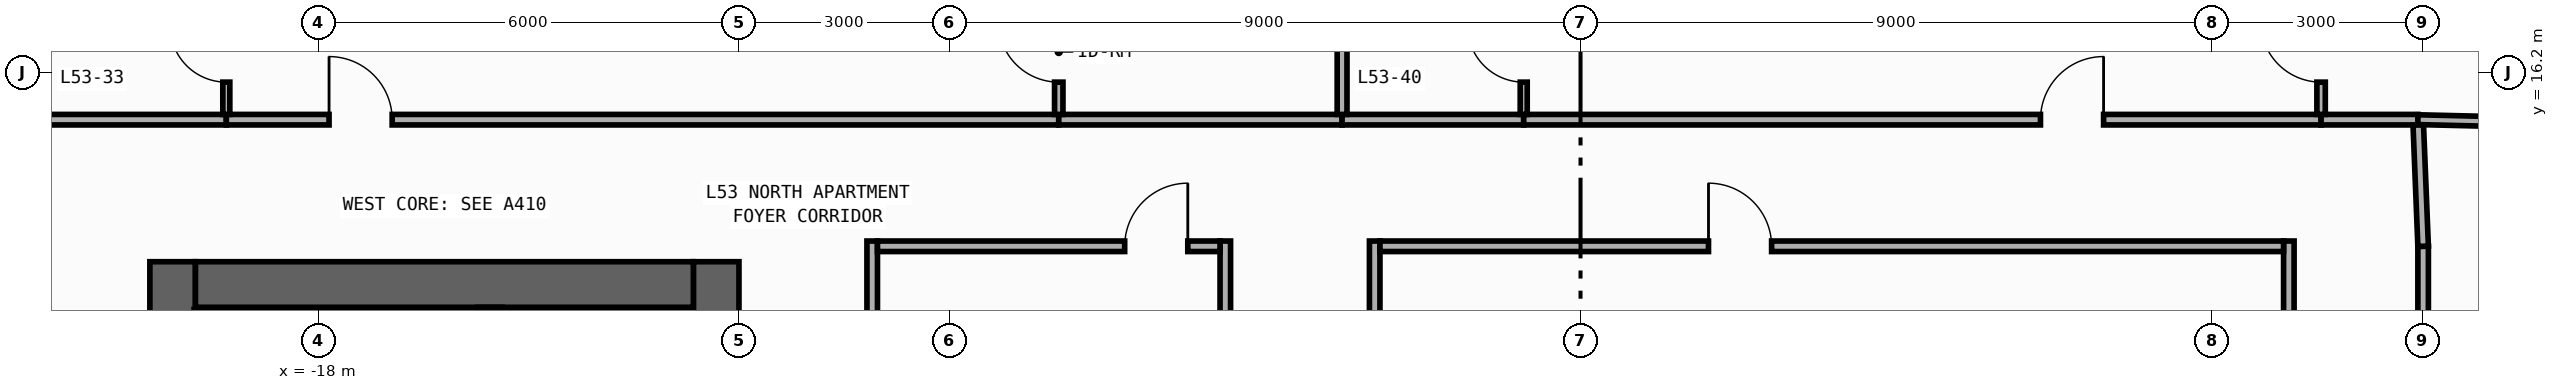
"""IFC4 building model, lengths in metres.
Left out: names, types, materials, properties, quantities, classifications, styles, units other than length and angle.
Written with IfcOpenShell. Run it as: python <this file> out.ifc"""

import sys

from ifc_helpers import new_model, si_unit, direction, frame, frame_2d, origin, place, context, subcontext, project, spatial, rectangle, extrude, element, fill, save


model = new_model("IFC4")
c1 = context("Model", 3, precision=1e-05, world=origin(), true_north=direction((0.0, 1.0)))
c2 = subcontext(c1, "Body", "Model", "MODEL_VIEW")
j1 = project(units=[si_unit("LENGTHUNIT", "METRE"), si_unit("PLANEANGLEUNIT", "RADIAN")], contexts=[c1])
p1 = place(None, origin())
s1 = spatial("IfcSite", under=j1, at=p1, CompositionType="ELEMENT")
p2 = place(p1, origin())
s2 = spatial("IfcBuilding", under=s1, at=p2, CompositionType="ELEMENT")
p3 = place(p2, frame((0.0, 0.0, 229.6)))
s3 = spatial("IfcBuildingStorey", under=s2, at=p3, CompositionType="ELEMENT", Elevation=229.6)
p4 = place(p3, frame((-20.075, -13.5, 0.0), z_axis=(0.0, 0.0, 1.0), x_axis=(0.0, 1.0, 0.0)))
e1 = element("IfcWall", 1, at=p4, inside=s3, PredefinedType="SHEAR", context=c2, shape_type="SweptSolid", body=[
    extrude(rectangle(XDim=27.0, YDim=0.65, at=frame_2d((13.5, 0.0))), origin(), (0.0, 0.0, 1.0), 3.34),
])
p5 = place(p3, frame((-12.325, -13.5, 0.0), z_axis=(0.0, 0.0, 1.0), x_axis=(0.0, 1.0, 0.0)))
e2 = element("IfcWall", 2, at=p5, inside=s3, PredefinedType="SHEAR", context=c2, shape_type="SweptSolid", body=[
    extrude(rectangle(XDim=27.0, YDim=0.65, at=frame_2d((13.5, 0.0))), origin(), (0.0, 0.0, 1.0), 3.34),
])
p6 = place(p5, frame((15.175, 0.0, 0.0)))
e3 = element("IfcOpeningElement", 3, at=p6, cuts=e2, PredefinedType="OPENING", context=c2, shape_type="SweptSolid", body=[
    extrude(rectangle(XDim=0.85, YDim=2.1, at=frame_2d((0.425, 1.05))), frame((0.0, 0.335, 0.0), z_axis=(0.0, -1.0, 0.0), x_axis=(1.0, 0.0, 0.0)), (0.0, 0.0, 1.0), 0.67),
])
p7 = place(p5, frame((21.275, 0.0, 0.0)))
e4 = element("IfcOpeningElement", 4, at=p7, cuts=e2, PredefinedType="OPENING", context=c2, shape_type="SweptSolid", body=[
    extrude(rectangle(XDim=0.85, YDim=2.1, at=frame_2d((0.425, 1.05))), frame((0.0, 0.335, 0.0), z_axis=(0.0, -1.0, 0.0), x_axis=(1.0, 0.0, 0.0)), (0.0, 0.0, 1.0), 0.67),
])
p8 = place(p5, frame((4.275, 0.0, 0.0)))
e5 = element("IfcOpeningElement", 5, at=p8, cuts=e2, PredefinedType="OPENING", context=c2, shape_type="SweptSolid", body=[
    extrude(rectangle(XDim=0.85, YDim=2.1, at=frame_2d((0.425, 1.05))), frame((0.0, 0.335, 0.0), z_axis=(0.0, -1.0, 0.0), x_axis=(1.0, 0.0, 0.0)), (0.0, 0.0, 1.0), 0.67),
])
p9 = place(p5, frame((10.275, 0.0, 0.0)))
e6 = element("IfcOpeningElement", 6, at=p9, cuts=e2, PredefinedType="OPENING", context=c2, shape_type="SweptSolid", body=[
    extrude(rectangle(XDim=0.85, YDim=2.1, at=frame_2d((0.425, 1.05))), frame((0.0, 0.335, 0.0), z_axis=(0.0, -1.0, 0.0), x_axis=(1.0, 0.0, 0.0)), (0.0, 0.0, 1.0), 0.67),
])
p10 = place(p5, frame((12.725, 0.0, 0.0)))
e7 = element("IfcOpeningElement", 7, at=p10, cuts=e2, PredefinedType="OPENING", context=c2, shape_type="SweptSolid", body=[
    extrude(rectangle(XDim=1.15, YDim=2.2, at=frame_2d((0.575, 1.1))), frame((0.0, 0.335, 0.0), z_axis=(0.0, -1.0, 0.0), x_axis=(1.0, 0.0, 0.0)), (0.0, 0.0, 1.0), 0.67),
])
p11 = place(p5, frame((1.625, 0.0, 0.0)))
e8 = element("IfcOpeningElement", 8, at=p11, cuts=e2, PredefinedType="OPENING", context=c2, shape_type="SweptSolid", body=[
    extrude(rectangle(XDim=0.85, YDim=2.1, at=frame_2d((0.425, 1.05))), frame((0.0, 0.335, 0.0), z_axis=(0.0, -1.0, 0.0), x_axis=(1.0, 0.0, 0.0)), (0.0, 0.0, 1.0), 0.67),
])
p12 = place(p3, frame((-19.75, 13.175, 0.0), z_axis=(0.0, 0.0, 1.0), x_axis=(1.0, 0.0, 0.0)))
e9 = element("IfcWall", 9, at=p12, inside=s3, PredefinedType="SHEAR", context=c2, shape_type="SweptSolid", body=[
    extrude(rectangle(XDim=7.1, YDim=0.65, at=frame_2d((3.55, 0.0))), origin(), (0.0, 0.0, 1.0), 3.34),
])
p13 = place(p3, frame((-15.55, -12.85, 0.0), z_axis=(0.0, 0.0, 1.0), x_axis=(0.0, 1.0, 0.0)))
e10 = element("IfcWall", 10, at=p13, inside=s3, PredefinedType="SHEAR", context=c2, shape_type="SweptSolid", body=[
    extrude(rectangle(XDim=25.7, YDim=0.35, at=frame_2d((12.85, 0.0))), origin(), (0.0, 0.0, 1.0), 3.34),
])
p14 = place(p13, frame((12.075, 0.0, 0.0)))
e11 = element("IfcOpeningElement", 11, at=p14, cuts=e10, PredefinedType="OPENING", context=c2, shape_type="SweptSolid", body=[
    extrude(rectangle(XDim=1.15, YDim=2.2, at=frame_2d((0.575, 1.1))), frame((0.0, 0.185, 0.0), z_axis=(0.0, -1.0, 0.0), x_axis=(1.0, 0.0, 0.0)), (0.0, 0.0, 1.0), 0.37),
])
p15 = place(p13, frame((0.975, 0.0, 0.0)))
e12 = element("IfcOpeningElement", 12, at=p15, cuts=e10, PredefinedType="OPENING", context=c2, shape_type="SweptSolid", body=[
    extrude(rectangle(XDim=0.85, YDim=2.1, at=frame_2d((0.425, 1.05))), frame((0.0, 0.185, 0.0), z_axis=(0.0, -1.0, 0.0), x_axis=(1.0, 0.0, 0.0)), (0.0, 0.0, 1.0), 0.37),
])
p16 = place(p3, frame((-19.77, 12.71, 0.0), z_axis=(0.0, 0.0, 1.0), x_axis=(1.0, 0.0, 0.0)))
e13 = element("IfcWall", 13, at=p16, inside=s3, PredefinedType="SHEAR", context=c2, shape_type="SweptSolid", body=[
    extrude(rectangle(XDim=4.065, YDim=0.22, at=frame_2d((2.032, 0.0))), origin(), (0.0, 0.0, 1.0), 3.34),
])
p17 = place(p3, frame((-10.1, -2.81, 0.0), z_axis=(0.0, 0.0, 1.0), x_axis=(0.0, 1.0, 0.0)))
e14 = element("IfcWall", 14, at=p17, inside=s3, PredefinedType="PARTITIONING", context=c2, shape_type="SweptSolid", body=[
    extrude(rectangle(XDim=16.605, YDim=0.15, at=frame_2d((8.302, 0.0))), origin(), (0.0, 0.0, 1.0), 3.34),
])
p18 = place(p17, frame((7.751, 0.0, 0.0)))
e15 = element("IfcOpeningElement", 15, at=p18, cuts=e14, PredefinedType="OPENING", context=c2, shape_type="SweptSolid", body=[
    extrude(rectangle(XDim=0.9, YDim=2.15, at=frame_2d((0.45, 1.075))), frame((0.0, 0.085, 0.0), z_axis=(0.0, -1.0, 0.0), x_axis=(1.0, 0.0, 0.0)), (0.0, 0.0, 1.0), 0.17),
])
p19 = place(p3, frame((12.015, 7.2, 0.0), z_axis=(0.0, 0.0, 1.0), x_axis=(0.0, 1.0, 0.0)))
e16 = element("IfcWall", 16, at=p19, inside=s3, PredefinedType="PARTITIONING", context=c2, shape_type="SweptSolid", body=[
    extrude(rectangle(XDim=6.52, YDim=0.15, at=frame_2d((3.26, 0.0))), origin(), (0.0, 0.0, 1.0), 3.34),
])
p20 = place(p19, frame((0.67, 0.0, 0.0)))
e17 = element("IfcOpeningElement", 17, at=p20, cuts=e16, PredefinedType="OPENING", context=c2, shape_type="SweptSolid", body=[
    extrude(rectangle(XDim=0.9, YDim=2.15, at=frame_2d((0.45, 1.075))), frame((0.0, 0.085, 0.0), z_axis=(0.0, -1.0, 0.0), x_axis=(1.0, 0.0, 0.0)), (0.0, 0.0, 1.0), 0.17),
])
p21 = place(p3, frame((10.1, -2.81, 0.0), z_axis=(0.0, 0.0, 1.0), x_axis=(0.0, 1.0, 0.0)))
e18 = element("IfcWall", 18, at=p21, inside=s3, PredefinedType="PARTITIONING", context=c2, shape_type="SweptSolid", body=[
    extrude(rectangle(XDim=16.605, YDim=0.15, at=frame_2d((8.302, 0.0))), origin(), (0.0, 0.0, 1.0), 3.34),
])
p22 = place(p21, frame((7.751, 0.0, 0.0)))
e19 = element("IfcOpeningElement", 19, at=p22, cuts=e18, PredefinedType="OPENING", context=c2, shape_type="SweptSolid", body=[
    extrude(rectangle(XDim=0.9, YDim=2.15, at=frame_2d((0.45, 1.075))), frame((0.0, 0.085, 0.0), z_axis=(0.0, -1.0, 0.0), x_axis=(1.0, 0.0, 0.0)), (0.0, 0.0, 1.0), 0.17),
])
p23 = place(p3, frame((-5.065, -2.66, 0.0), z_axis=(0.0, 0.0, 1.0), x_axis=(0.0, 1.0, 0.0)))
e20 = element("IfcWall", 20, at=p23, inside=s3, PredefinedType="PARTITIONING", context=c2, shape_type="SweptSolid", body=[
    extrude(rectangle(XDim=16.455, YDim=0.15, at=frame_2d((8.228, 0.0))), origin(), (0.0, 0.0, 1.0), 2.99),
])
p24 = place(p23, frame((7.677, 0.0, 0.0)))
e21 = element("IfcOpeningElement", 21, at=p24, cuts=e20, PredefinedType="OPENING", context=c2, shape_type="SweptSolid", body=[
    extrude(rectangle(XDim=0.9, YDim=2.15, at=frame_2d((0.45, 1.075))), frame((0.0, 0.085, 0.0), z_axis=(0.0, -1.0, 0.0), x_axis=(1.0, 0.0, 0.0)), (0.0, 0.0, 1.0), 0.17),
])
p25 = place(p3, frame((-2.935, -2.66, 0.0), z_axis=(0.0, 0.0, 1.0), x_axis=(0.0, 1.0, 0.0)))
e22 = element("IfcWall", 22, at=p25, inside=s3, PredefinedType="PARTITIONING", context=c2, shape_type="SweptSolid", body=[
    extrude(rectangle(XDim=16.455, YDim=0.15, at=frame_2d((8.228, 0.0))), origin(), (0.0, 0.0, 1.0), 3.34),
])
p26 = place(p25, frame((7.677, 0.0, 0.0)))
e23 = element("IfcOpeningElement", 23, at=p26, cuts=e22, PredefinedType="OPENING", context=c2, shape_type="SweptSolid", body=[
    extrude(rectangle(XDim=0.9, YDim=2.15, at=frame_2d((0.45, 1.075))), frame((0.0, 0.085, 0.0), z_axis=(0.0, -1.0, 0.0), x_axis=(1.0, 0.0, 0.0)), (0.0, 0.0, 1.0), 0.17),
])
p27 = place(p3, frame((-21.955, 15.525, 0.0), z_axis=(0.0, 0.0, 1.0), x_axis=(1.0, 0.0, 0.0)))
e24 = element("IfcWall", 24, at=p27, inside=s3, PredefinedType="PARTITIONING", context=c2, shape_type="SweptSolid", body=[
    extrude(rectangle(XDim=2.645, YDim=0.15, at=frame_2d((1.323, 0.0))), origin(), (0.0, 0.0, 1.0), 3.34),
])
p28 = place(p3, frame((-19.31, 15.525, 0.0), z_axis=(0.0, 0.0, 1.0), x_axis=(1.0, 0.0, 0.0)))
e25 = element("IfcWall", 25, at=p28, inside=s3, PredefinedType="PARTITIONING", context=c2, shape_type="SweptSolid", body=[
    extrude(rectangle(XDim=11.87, YDim=0.15, at=frame_2d((5.935, 0.0))), origin(), (0.0, 0.0, 1.0), 3.34),
])
p29 = place(p28, frame((1.465, 0.0, 0.0)))
e26 = element("IfcOpeningElement", 26, at=p29, cuts=e25, PredefinedType="OPENING", context=c2, shape_type="SweptSolid", body=[
    extrude(rectangle(XDim=0.9, YDim=2.15, at=frame_2d((0.45, 1.075))), frame((0.0, 0.085, 0.0), z_axis=(0.0, -1.0, 0.0), x_axis=(1.0, 0.0, 0.0)), (0.0, 0.0, 1.0), 0.17),
])
p30 = place(p3, frame((-7.44, 15.525, 0.0), z_axis=(0.0, 0.0, 1.0), x_axis=(1.0, 0.0, 0.0)))
e27 = element("IfcWall", 27, at=p30, inside=s3, PredefinedType="PARTITIONING", context=c2, shape_type="SweptSolid", body=[
    extrude(rectangle(XDim=4.04, YDim=0.15, at=frame_2d((2.02, 0.0))), origin(), (0.0, 0.0, 1.0), 3.34),
])
p31 = place(p3, frame((-3.4, 15.525, 0.0), z_axis=(0.0, 0.0, 1.0), x_axis=(1.0, 0.0, 0.0)))
e28 = element("IfcWall", 28, at=p31, inside=s3, PredefinedType="PARTITIONING", context=c2, shape_type="SweptSolid", body=[
    extrude(rectangle(XDim=2.59, YDim=0.15, at=frame_2d((1.295, 0.0))), origin(), (0.0, 0.0, 1.0), 3.34),
])
p32 = place(p3, frame((-0.81, 15.525, 0.0), z_axis=(0.0, 0.0, 1.0), x_axis=(1.0, 0.0, 0.0)))
e29 = element("IfcWall", 29, at=p32, inside=s3, PredefinedType="PARTITIONING", context=c2, shape_type="SweptSolid", body=[
    extrude(rectangle(XDim=11.37, YDim=0.15, at=frame_2d((5.685, 0.0))), origin(), (0.0, 0.0, 1.0), 3.34),
])
p33 = place(p32, frame((7.368, 0.0, 0.0)))
e30 = element("IfcOpeningElement", 30, at=p33, cuts=e29, PredefinedType="OPENING", context=c2, shape_type="SweptSolid", body=[
    extrude(rectangle(XDim=0.9, YDim=2.15, at=frame_2d((0.45, 1.075))), frame((0.0, 0.085, 0.0), z_axis=(0.0, -1.0, 0.0), x_axis=(1.0, 0.0, 0.0)), (0.0, 0.0, 1.0), 0.17),
])
p34 = place(p3, frame((10.56, 15.525, 0.0), z_axis=(0.0, 0.0, 1.0), x_axis=(1.0, 0.0, 0.0)))
e31 = element("IfcWall", 31, at=p34, inside=s3, PredefinedType="PARTITIONING", context=c2, shape_type="SweptSolid", body=[
    extrude(rectangle(XDim=1.38, YDim=0.15, at=frame_2d((0.69, 0.0))), origin(), (0.0, 0.0, 1.0), 3.34),
])
p35 = place(p3, frame((12.015, 13.72, 0.0), z_axis=(0.0, 0.0, 1.0), x_axis=(-0.040046877756, 0.99919780203, 0.0)))
e32 = element("IfcWall", 32, at=p35, inside=s3, PredefinedType="PARTITIONING", context=c2, shape_type="SweptSolid", body=[
    extrude(rectangle(XDim=1.731, YDim=0.15, at=frame_2d((0.866, 0.0))), origin(), (0.0, 0.0, 1.0), 3.34),
])
p36 = place(p3, frame((-10.025, 13.72, 0.0), z_axis=(0.0, 0.0, 1.0), x_axis=(1.0, 0.0, 0.0)))
e33 = element("IfcWall", 33, at=p36, inside=s3, PredefinedType="PARTITIONING", context=c2, shape_type="SweptSolid", body=[
    extrude(rectangle(XDim=4.885, YDim=0.15, at=frame_2d((2.442, 0.0))), origin(), (0.0, 0.0, 1.0), 3.34),
])
p37 = place(p36, frame((3.525, 0.0, 0.0)))
e34 = element("IfcOpeningElement", 34, at=p37, cuts=e33, PredefinedType="OPENING", context=c2, shape_type="SweptSolid", body=[
    extrude(rectangle(XDim=0.9, YDim=2.15, at=frame_2d((0.45, 1.075))), frame((0.0, 0.085, 0.0), z_axis=(0.0, -1.0, 0.0), x_axis=(1.0, 0.0, 0.0)), (0.0, 0.0, 1.0), 0.17),
])
p38 = place(p3, frame((-2.86, 13.72, 0.0), z_axis=(0.0, 0.0, 1.0), x_axis=(1.0, 0.0, 0.0)))
e35 = element("IfcWall", 35, at=p38, inside=s3, PredefinedType="PARTITIONING", context=c2, shape_type="SweptSolid", body=[
    extrude(rectangle(XDim=12.885, YDim=0.15, at=frame_2d((6.442, 0.0))), origin(), (0.0, 0.0, 1.0), 3.34),
])
p39 = place(p38, frame((4.685, 0.0, 0.0)))
e36 = element("IfcOpeningElement", 36, at=p39, cuts=e35, PredefinedType="OPENING", context=c2, shape_type="SweptSolid", body=[
    extrude(rectangle(XDim=0.9, YDim=2.15, at=frame_2d((0.45, 1.075))), frame((0.0, 0.085, 0.0), z_axis=(0.0, -1.0, 0.0), x_axis=(1.0, 0.0, 0.0)), (0.0, 0.0, 1.0), 0.17),
])
p40 = place(p3, frame((-19.31, 15.6, 0.0), z_axis=(0.0, 0.0, 1.0), x_axis=(0.0, 1.0, 0.0)))
e37 = element("IfcWall", 37, at=p40, inside=s3, PredefinedType="PARTITIONING", context=c2, shape_type="SweptSolid", body=[
    extrude(rectangle(XDim=2.5, YDim=0.1, at=frame_2d((1.25, 0.0))), origin(), (0.0, 0.0, 1.0), 3.34),
])
p41 = place(p40, frame((0.46, 0.0, 0.0)))
e38 = element("IfcOpeningElement", 38, at=p41, cuts=e37, PredefinedType="OPENING", context=c2, shape_type="SweptSolid", body=[
    extrude(rectangle(XDim=0.8, YDim=2.1, at=frame_2d((0.4, 1.05))), frame((0.0, 0.06, 0.0), z_axis=(0.0, -1.0, 0.0), x_axis=(1.0, 0.0, 0.0)), (0.0, 0.0, 1.0), 0.12),
])
p42 = place(p3, frame((-7.44, 15.6, 0.0), z_axis=(0.0, 0.0, 1.0), x_axis=(0.0, 1.0, 0.0)))
e39 = element("IfcWall", 39, at=p42, inside=s3, PredefinedType="PARTITIONING", context=c2, shape_type="SweptSolid", body=[
    extrude(rectangle(XDim=4.5, YDim=0.12, at=frame_2d((2.25, 0.0))), origin(), (0.0, 0.0, 1.0), 3.34),
])
p43 = place(p42, frame((0.46, 0.0, 0.0)))
e40 = element("IfcOpeningElement", 40, at=p43, cuts=e39, PredefinedType="OPENING", context=c2, shape_type="SweptSolid", body=[
    extrude(rectangle(XDim=0.86, YDim=2.15, at=frame_2d((0.43, 1.075))), frame((0.0, 0.07, 0.0), z_axis=(0.0, -1.0, 0.0), x_axis=(1.0, 0.0, 0.0)), (0.0, 0.0, 1.0), 0.14),
])
p44 = place(p3, frame((-3.4, 15.6, 0.0), z_axis=(0.0, 0.0, 1.0), x_axis=(0.0, 1.0, 0.0)))
e41 = element("IfcWall", 41, at=p44, inside=s3, PredefinedType="PARTITIONING", context=c2, shape_type="SweptSolid", body=[
    extrude(rectangle(XDim=2.5, YDim=0.14, at=frame_2d((1.25, 0.0))), origin(), (0.0, 0.0, 1.0), 3.34),
])
p45 = place(p3, frame((-0.81, 15.6, 0.0), z_axis=(0.0, 0.0, 1.0), x_axis=(0.0, 1.0, 0.0)))
e42 = element("IfcWall", 42, at=p45, inside=s3, PredefinedType="PARTITIONING", context=c2, shape_type="SweptSolid", body=[
    extrude(rectangle(XDim=2.5, YDim=0.1, at=frame_2d((1.25, 0.0))), origin(), (0.0, 0.0, 1.0), 3.34),
])
p46 = place(p45, frame((0.46, 0.0, 0.0)))
e43 = element("IfcOpeningElement", 43, at=p46, cuts=e42, PredefinedType="OPENING", context=c2, shape_type="SweptSolid", body=[
    extrude(rectangle(XDim=0.8, YDim=2.1, at=frame_2d((0.4, 1.05))), frame((0.0, 0.06, 0.0), z_axis=(0.0, -1.0, 0.0), x_axis=(1.0, 0.0, 0.0)), (0.0, 0.0, 1.0), 0.12),
])
p47 = place(p3, frame((10.56, 15.6, 0.0), z_axis=(0.0, 0.0, 1.0), x_axis=(0.0, 1.0, 0.0)))
e44 = element("IfcWall", 44, at=p47, inside=s3, PredefinedType="PARTITIONING", context=c2, shape_type="SweptSolid", body=[
    extrude(rectangle(XDim=4.5, YDim=0.12, at=frame_2d((2.25, 0.0))), origin(), (0.0, 0.0, 1.0), 3.34),
])
p48 = place(p47, frame((0.46, 0.0, 0.0)))
e45 = element("IfcOpeningElement", 45, at=p48, cuts=e44, PredefinedType="OPENING", context=c2, shape_type="SweptSolid", body=[
    extrude(rectangle(XDim=0.86, YDim=2.15, at=frame_2d((0.43, 1.075))), frame((0.0, 0.07, 0.0), z_axis=(0.0, -1.0, 0.0), x_axis=(1.0, 0.0, 0.0)), (0.0, 0.0, 1.0), 0.14),
])
p49 = place(p3, frame((11.94, 15.525, 0.0), z_axis=(0.0, 0.0, 1.0), x_axis=(0.999719241816, -0.023694673289, 0.0)))
e46 = element("IfcWall", 46, at=p49, inside=s3, PredefinedType="PARTITIONING", context=c2, shape_type="SweptSolid", body=[
    extrude(rectangle(XDim=2.741, YDim=0.14, at=frame_2d((1.37, 0.0))), origin(), (0.0, 0.0, 1.0), 3.34),
])
p50 = place(p29, origin())
e47 = element("IfcDoor", 47, at=p50, inside=s3, OperationType="SINGLE_SWING_LEFT", PredefinedType="DOOR", context=c2, shape_type="SweptSolid", body=[
    extrude(rectangle(XDim=0.9, YDim=2.15, at=frame_2d((0.45, 1.075))), frame((0.0, 0.025, 0.0), z_axis=(0.0, -1.0, 0.0), x_axis=(1.0, 0.0, 0.0)), (0.0, 0.0, 1.0), 0.05),
])
fill(e26, e47)
p51 = place(p33, origin())
e48 = element("IfcDoor", 48, at=p51, inside=s3, OperationType="SINGLE_SWING_RIGHT", PredefinedType="DOOR", context=c2, shape_type="SweptSolid", body=[
    extrude(rectangle(XDim=0.9, YDim=2.15, at=frame_2d((0.45, 1.075))), frame((0.0, 0.025, 0.0), z_axis=(0.0, -1.0, 0.0), x_axis=(1.0, 0.0, 0.0)), (0.0, 0.0, 1.0), 0.05),
])
fill(e30, e48)
p52 = place(p37, origin())
e49 = element("IfcDoor", 49, at=p52, inside=s3, OperationType="SINGLE_SWING_RIGHT", PredefinedType="DOOR", context=c2, shape_type="SweptSolid", body=[
    extrude(rectangle(XDim=0.9, YDim=2.15, at=frame_2d((0.45, 1.075))), frame((0.0, 0.025, 0.0), z_axis=(0.0, -1.0, 0.0), x_axis=(1.0, 0.0, 0.0)), (0.0, 0.0, 1.0), 0.05),
])
fill(e34, e49)
p53 = place(p39, origin())
e50 = element("IfcDoor", 50, at=p53, inside=s3, OperationType="SINGLE_SWING_LEFT", PredefinedType="DOOR", context=c2, shape_type="SweptSolid", body=[
    extrude(rectangle(XDim=0.9, YDim=2.15, at=frame_2d((0.45, 1.075))), frame((0.0, 0.025, 0.0), z_axis=(0.0, -1.0, 0.0), x_axis=(1.0, 0.0, 0.0)), (0.0, 0.0, 1.0), 0.05),
])
fill(e36, e50)
p54 = place(p41, origin())
e51 = element("IfcDoor", 51, at=p54, inside=s3, OperationType="SINGLE_SWING_RIGHT", PredefinedType="DOOR", context=c2, shape_type="SweptSolid", body=[
    extrude(rectangle(XDim=0.8, YDim=2.1, at=frame_2d((0.4, 1.05))), frame((0.0, 0.025, 0.0), z_axis=(0.0, -1.0, 0.0), x_axis=(1.0, 0.0, 0.0)), (0.0, 0.0, 1.0), 0.05),
])
fill(e38, e51)
p55 = place(p43, origin())
e52 = element("IfcDoor", 52, at=p55, inside=s3, OperationType="SINGLE_SWING_RIGHT", PredefinedType="DOOR", context=c2, shape_type="SweptSolid", body=[
    extrude(rectangle(XDim=0.86, YDim=2.15, at=frame_2d((0.43, 1.075))), frame((0.0, 0.025, 0.0), z_axis=(0.0, -1.0, 0.0), x_axis=(1.0, 0.0, 0.0)), (0.0, 0.0, 1.0), 0.05),
])
fill(e40, e52)
p56 = place(p46, origin())
e53 = element("IfcDoor", 53, at=p56, inside=s3, OperationType="SINGLE_SWING_RIGHT", PredefinedType="DOOR", context=c2, shape_type="SweptSolid", body=[
    extrude(rectangle(XDim=0.8, YDim=2.1, at=frame_2d((0.4, 1.05))), frame((0.0, 0.025, 0.0), z_axis=(0.0, -1.0, 0.0), x_axis=(1.0, 0.0, 0.0)), (0.0, 0.0, 1.0), 0.05),
])
fill(e43, e53)
p57 = place(p48, origin())
e54 = element("IfcDoor", 54, at=p57, inside=s3, OperationType="SINGLE_SWING_RIGHT", PredefinedType="DOOR", context=c2, shape_type="SweptSolid", body=[
    extrude(rectangle(XDim=0.86, YDim=2.15, at=frame_2d((0.43, 1.075))), frame((0.0, 0.025, 0.0), z_axis=(0.0, -1.0, 0.0), x_axis=(1.0, 0.0, 0.0)), (0.0, 0.0, 1.0), 0.05),
])
fill(e45, e54)
save(model, sys.argv[1])
